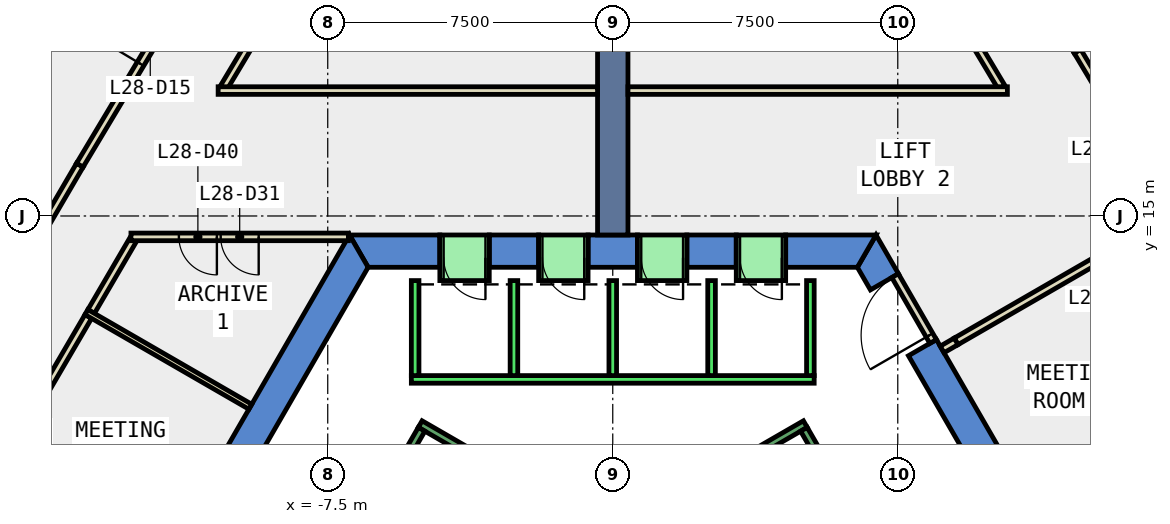
"""IFC4 building model, lengths in metres.
Left out: names, types, materials, properties, quantities, classifications, styles, units other than length and angle.
Written with IfcOpenShell. Run it as: python <this file> out.ifc"""

import sys

from ifc_helpers import new_model, si_unit, direction, frame, frame_2d, origin, place, context, subcontext, project, spatial, polyline, rectangle, outline, extrude, element, fill, save


model = new_model("IFC4")
c1 = context("Model", 3, precision=1e-05, world=origin(), true_north=direction((0.0, 1.0)))
c2 = subcontext(c1, "Body", "Model", "MODEL_VIEW")
j1 = project(units=[si_unit("LENGTHUNIT", "METRE"), si_unit("PLANEANGLEUNIT", "RADIAN")], contexts=[c1])
p1 = place(None, origin())
s1 = spatial("IfcSite", under=j1, at=p1, CompositionType="ELEMENT")
p2 = place(p1, origin())
s2 = spatial("IfcBuilding", under=s1, at=p2, CompositionType="ELEMENT")
p3 = place(p2, frame((0.0, 0.0, 128.6)))
s3 = spatial("IfcBuildingStorey", under=s2, at=p3, CompositionType="ELEMENT", Elevation=128.6)
p4 = place(p3, frame((0.0, 0.0, -0.4)))
e1 = element("IfcWall", 1, at=p4, inside=s3, PredefinedType="SHEAR", context=c2, shape_type="SweptSolid", body=[
    extrude(outline(polyline([(8.517, 11.748), (7.781, 11.323), (12.875, 2.5), (13.856, 2.5), (8.517, 11.748)])), origin(), (0.0, 0.0, 1.0), 4.0),
])
p5 = place(p3, frame((0.0, 0.0, -0.4)))
e2 = element("IfcWall", 2, at=p5, inside=s3, PredefinedType="SHEAR", context=c2, shape_type="SweptSolid", body=[
    extrude(outline(polyline([(6.781, 13.055), (7.517, 13.48), (6.928, 14.5), (6.437, 13.65), (6.781, 13.055)])), origin(), (0.0, 0.0, 1.0), 4.0),
])
p6 = place(p3, frame((0.0, 0.0, -0.4)))
e3 = element("IfcWall", 3, at=p6, inside=s3, PredefinedType="SHEAR", context=c2, shape_type="SweptSolid", body=[
    extrude(outline(polyline([(4.55, 14.5), (4.55, 13.65), (6.437, 13.65), (6.928, 14.5), (4.55, 14.5)])), origin(), (0.0, 0.0, 1.0), 4.0),
])
p7 = place(p3, frame((0.0, 0.0, -0.4)))
e4 = element("IfcWall", 4, at=p7, inside=s3, PredefinedType="SHEAR", context=c2, shape_type="SweptSolid", body=[
    extrude(outline(polyline([(1.95, 14.5), (1.95, 13.65), (3.25, 13.65), (3.25, 14.5), (1.95, 14.5)])), origin(), (0.0, 0.0, 1.0), 4.0),
])
p8 = place(p3, frame((0.0, 0.0, -0.4)))
e5 = element("IfcWall", 5, at=p8, inside=s3, PredefinedType="SHEAR", context=c2, shape_type="SweptSolid", body=[
    extrude(outline(polyline([(-0.65, 14.5), (-0.65, 13.65), (0.65, 13.65), (0.65, 14.5), (-0.65, 14.5)])), origin(), (0.0, 0.0, 1.0), 4.0),
])
p9 = place(p3, frame((0.0, 0.0, -0.4)))
e6 = element("IfcWall", 6, at=p9, inside=s3, PredefinedType="SHEAR", context=c2, shape_type="SweptSolid", body=[
    extrude(outline(polyline([(-3.25, 14.5), (-3.25, 13.65), (-1.95, 13.65), (-1.95, 14.5), (-3.25, 14.5)])), origin(), (0.0, 0.0, 1.0), 4.0),
])
p10 = place(p3, frame((0.0, 0.0, -0.4)))
e7 = element("IfcWall", 7, at=p10, inside=s3, PredefinedType="SHEAR", context=c2, shape_type="SweptSolid", body=[
    extrude(outline(polyline([(-4.55, 13.65), (-4.55, 14.5), (-6.928, 14.5), (-6.437, 13.65), (-4.55, 13.65)])), origin(), (0.0, 0.0, 1.0), 4.0),
])
p11 = place(p3, frame((0.0, 0.0, -0.4)))
e8 = element("IfcWall", 8, at=p11, inside=s3, PredefinedType="SHEAR", context=c2, shape_type="SweptSolid", body=[
    extrude(outline(polyline([(-12.267, 5.252), (-11.531, 4.827), (-6.437, 13.65), (-6.928, 14.5), (-12.267, 5.252)])), origin(), (0.0, 0.0, 1.0), 4.0),
])
p12 = place(p3, frame((0.0, 14.5, -0.4), z_axis=(0.0, 0.0, 1.0), x_axis=(0.0, 1.0, 0.0)))
e9 = element("IfcWall", 9, at=p12, inside=s3, PredefinedType="SHEAR", context=c2, shape_type="SweptSolid", body=[
    extrude(rectangle(XDim=9.0, YDim=0.8, at=frame_2d((4.5, 0.0))), origin(), (0.0, 0.0, 1.0), 4.0),
])
p13 = place(p3, frame((-12.628, 14.364, 0.0), z_axis=(0.0, 0.0, 1.0), x_axis=(-0.504457175129, -0.863436713639, 0.0)))
e10 = element("IfcWall", 10, at=p13, inside=s3, PredefinedType="PARTITIONING", context=c2, shape_type="SweptSolid", body=[
    extrude(rectangle(XDim=2.175, YDim=0.2, at=frame_2d((1.087, 0.0))), origin(), (0.0, 0.0, 1.0), 3.6),
])
p14 = place(p3, frame((-13.801, 12.356, 0.0), z_axis=(0.0, 0.0, 1.0), x_axis=(-0.504282474222, -0.863538757782, 0.0)))
e11 = element("IfcWall", 11, at=p14, inside=s3, PredefinedType="PARTITIONING", context=c2, shape_type="SweptSolid", body=[
    extrude(rectangle(XDim=3.8, YDim=0.2, at=frame_2d((1.9, 0.0))), origin(), (0.0, 0.0, 1.0), 3.6),
])
p15 = place(p3, frame((12.798, 13.873, 0.0), z_axis=(0.0, 0.0, 1.0), x_axis=(-0.866080799279, -0.499904039911, 0.0)))
e12 = element("IfcWall", 12, at=p15, inside=s3, PredefinedType="PARTITIONING", context=c2, shape_type="SweptSolid", body=[
    extrude(rectangle(XDim=4.345, YDim=0.2, at=frame_2d((2.172, 0.0))), origin(), (0.0, 0.0, 1.0), 3.6),
])
for number, where, z_axis, x_axis in (
    (13, (10.232, 18.386, 0.0), (0.0, 0.0, 1.0), (-0.514, 0.858, 0.0)),
    (14, (-8.475, 21.321, 0.0), (0.0, 0.0, 1.0), (-0.514, -0.858, 0.0)),
):
    element("IfcWall", number, at=place(p3, frame(where, z_axis=z_axis, x_axis=x_axis)), inside=s3, PredefinedType="PARTITIONING", context=c2, shape_type="SweptSolid", body=[
        extrude(rectangle(XDim=3.421, YDim=0.2, at=frame_2d((1.71, 0.0))), origin(), (0.0, 0.0, 1.0), 3.6),
    ])
p16 = place(p3, frame((12.228, 19.335, 0.0), z_axis=(0.0, 0.0, 1.0), x_axis=(0.513796731551, -0.857911952736, 0.0)))
e15 = element("IfcWall", 15, at=p16, inside=s3, PredefinedType="PARTITIONING", context=c2, shape_type="SweptSolid", body=[
    extrude(rectangle(XDim=3.493, YDim=0.2, at=frame_2d((1.747, 0.0))), origin(), (0.0, 0.0, 1.0), 3.6),
])
p17 = place(p16, frame((1.247, 0.0, 0.0)))
e16 = element("IfcOpeningElement", 16, at=p17, cuts=e15, PredefinedType="OPENING", context=c2, shape_type="SweptSolid", body=[
    extrude(rectangle(XDim=1.0, YDim=2.1, at=frame_2d((0.5, 1.05))), frame((0.0, 0.11, 0.0), z_axis=(0.0, -1.0, 0.0), x_axis=(1.0, 0.0, 0.0)), (0.0, 0.0, 1.0), 0.22),
])
p18 = place(p3, frame((-15.784, 13.322, 0.0), z_axis=(0.0, 0.0, 1.0), x_axis=(0.50424043703, 0.863563304954, 0.0)))
e17 = element("IfcWall", 17, at=p18, inside=s3, PredefinedType="PARTITIONING", context=c2, shape_type="SweptSolid", body=[
    extrude(rectangle(XDim=3.492, YDim=0.2, at=frame_2d((1.746, 0.0))), origin(), (0.0, 0.0, 1.0), 3.6),
])
p19 = place(p3, frame((-14.023, 16.338, 0.0), z_axis=(0.0, 0.0, 1.0), x_axis=(0.513773581048, 0.857925816966, 0.0)))
e18 = element("IfcWall", 18, at=p19, inside=s3, PredefinedType="PARTITIONING", context=c2, shape_type="SweptSolid", body=[
    extrude(rectangle(XDim=7.061, YDim=0.2, at=frame_2d((3.531, 0.0))), origin(), (0.0, 0.0, 1.0), 3.6),
])
p20 = place(p19, frame((3.106, 0.0, 0.0)))
e19 = element("IfcOpeningElement", 19, at=p20, cuts=e18, PredefinedType="OPENING", context=c2, shape_type="SweptSolid", body=[
    extrude(rectangle(XDim=1.0, YDim=2.1, at=frame_2d((0.5, 1.05))), frame((0.0, 0.11, 0.0), z_axis=(0.0, -1.0, 0.0), x_axis=(1.0, 0.0, 0.0)), (0.0, 0.0, 1.0), 0.22),
])
p21 = place(p3, frame((-9.537, 9.981, 0.0), z_axis=(0.0, 0.0, 1.0), x_axis=(-0.866035377451, 0.499982724704, 0.0)))
e20 = element("IfcWall", 20, at=p21, inside=s3, PredefinedType="PARTITIONING", context=c2, shape_type="SweptSolid", body=[
    extrude(rectangle(XDim=4.98, YDim=0.15, at=frame_2d((2.49, 0.0))), origin(), (0.0, 0.0, 1.0), 3.6),
])
p22 = place(p3, frame((-6.957, 14.45, 0.0), z_axis=(0.0, 0.0, 1.0), x_axis=(-1.0, 0.0, 0.0)))
e21 = element("IfcWall", 21, at=p22, inside=s3, PredefinedType="PARTITIONING", context=c2, shape_type="SweptSolid", body=[
    extrude(rectangle(XDim=5.721, YDim=0.2, at=frame_2d((2.86, 0.0))), origin(), (0.0, 0.0, 1.0), 3.6),
])
p23 = place(p22, frame((2.36, 0.0, 0.0)))
e22 = element("IfcOpeningElement", 22, at=p23, cuts=e21, PredefinedType="OPENING", context=c2, shape_type="SweptSolid", body=[
    extrude(rectangle(XDim=1.0, YDim=2.1, at=frame_2d((0.5, 1.05))), frame((0.0, 0.11, 0.0), z_axis=(0.0, -1.0, 0.0), x_axis=(1.0, 0.0, 0.0)), (0.0, 0.0, 1.0), 0.22),
])
p24 = place(p22, frame((3.46, 0.0, 0.0)))
e23 = element("IfcOpeningElement", 23, at=p24, cuts=e21, PredefinedType="OPENING", context=c2, shape_type="SweptSolid", body=[
    extrude(rectangle(XDim=1.0, YDim=2.1, at=frame_2d((0.5, 1.05))), frame((0.0, 0.11, 0.0), z_axis=(0.0, -1.0, 0.0), x_axis=(1.0, 0.0, 0.0)), (0.0, 0.0, 1.0), 0.22),
])
p25 = place(p3, frame((11.261, 6.994, 0.0), z_axis=(0.0, 0.0, 1.0), x_axis=(0.866013769041, 0.500020151426, 0.0)))
e24 = element("IfcWall", 24, at=p25, inside=s3, PredefinedType="PARTITIONING", context=c2, shape_type="SweptSolid", body=[
    extrude(rectangle(XDim=4.898, YDim=0.15, at=frame_2d((2.449, 0.0))), origin(), (0.0, 0.0, 1.0), 3.6),
])
for number, where, z_axis, x_axis in (
    (25, (0.4, 18.3, 0.0), (0.0, 0.0, 1.0), (1.0, 0.0, 0.0)),
    (26, (-10.384, 18.3, 0.0), (0.0, 0.0, 1.0), (1.0, 0.0, 0.0)),
):
    element("IfcWall", number, at=place(p3, frame(where, z_axis=z_axis, x_axis=x_axis)), inside=s3, PredefinedType="PARTITIONING", context=c2, shape_type="SweptSolid", body=[
        extrude(rectangle(XDim=9.984, YDim=0.2, at=frame_2d((4.992, 0.0))), origin(), (0.0, 0.0, 1.0), 3.6),
    ])
p26 = place(p3, frame((12.104, 19.348, 0.0), z_axis=(0.0, 0.0, 1.0), x_axis=(0.85799008499, 0.513666247732, 0.0)))
e27 = element("IfcWall", 27, at=p26, inside=s3, PredefinedType="PARTITIONING", context=c2, shape_type="SweptSolid", body=[
    extrude(rectangle(XDim=7.1, YDim=0.15, at=frame_2d((3.55, 0.0))), origin(), (0.0, 0.0, 1.0), 3.6),
])
p27 = place(p3, frame((8.43, 11.698, 0.0), z_axis=(0.0, 0.0, 1.0), x_axis=(-0.50002537861, 0.866010750942, 0.0)))
e28 = element("IfcWall", 28, at=p27, inside=s3, PredefinedType="PARTITIONING", context=c2, shape_type="SweptSolid", body=[
    extrude(rectangle(XDim=2.0, YDim=0.2, at=frame_2d((1.0, 0.0))), origin(), (0.0, 0.0, 1.0), 2.4),
])
p28 = place(p27, frame((0.19, 0.0, 0.0)))
e29 = element("IfcOpeningElement", 29, at=p28, cuts=e28, PredefinedType="OPENING", context=c2, shape_type="SweptSolid", body=[
    extrude(rectangle(XDim=1.8, YDim=2.1, at=frame_2d((0.9, 1.05))), frame((0.0, 0.11, 0.0), z_axis=(0.0, -1.0, 0.0), x_axis=(1.0, 0.0, 0.0)), (0.0, 0.0, 1.0), 0.22),
])
p29 = place(p3, frame((9.035, 11.701, 0.0), z_axis=(0.0, 0.0, 1.0), x_axis=(-0.865544229481, -0.500832493767, 0.0)))
e30 = element("IfcWall", 30, at=p29, inside=s3, PredefinedType="PARTITIONING", context=c2, shape_type="SweptSolid", body=[
    extrude(rectangle(XDim=0.425, YDim=0.2, at=frame_2d((0.212, 0.0))), origin(), (0.0, 0.0, 1.0), 2.4),
])
p30 = place(p3, frame((5.3, 10.7, 0.0), z_axis=(0.0, 0.0, 1.0), x_axis=(-1.0, 0.0, 0.0)))
e31 = element("IfcWall", 31, at=p30, inside=s3, PredefinedType="STANDARD", context=c2, shape_type="SweptSolid", body=[
    extrude(rectangle(XDim=10.6, YDim=0.2, at=frame_2d((5.3, 0.0))), origin(), (0.0, 0.0, 1.0), 3.6),
])
for number, where, z_axis, x_axis in (
    (32, (5.2, 10.8, 0.0), (0.0, 0.0, 1.0), (0.0, 1.0, 0.0)),
    (33, (2.6, 10.8, 0.0), (0.0, 0.0, 1.0), (0.0, 1.0, 0.0)),
    (34, (0.0, 10.8, 0.0), (0.0, 0.0, 1.0), (0.0, 1.0, 0.0)),
    (35, (-2.6, 10.8, 0.0), (0.0, 0.0, 1.0), (0.0, 1.0, 0.0)),
    (36, (-5.2, 10.8, 0.0), (0.0, 0.0, 1.0), (0.0, 1.0, 0.0)),
):
    element("IfcWall", number, at=place(p3, frame(where, z_axis=z_axis, x_axis=x_axis)), inside=s3, PredefinedType="STANDARD", context=c2, shape_type="SweptSolid", body=[
        extrude(rectangle(XDim=2.5, YDim=0.2, at=frame_2d((1.25, 0.0))), origin(), (0.0, 0.0, 1.0), 3.6),
    ])
p31 = place(p3, frame((4.55, 13.9, 0.0), z_axis=(0.0, 0.0, 1.0), x_axis=(-1.0, 0.0, 0.0)))
e37 = element("IfcWall", 37, at=p31, inside=s3, PredefinedType="STANDARD", context=c2, shape_type="SweptSolid", body=[
    extrude(rectangle(XDim=1.3, YDim=1.2, at=frame_2d((0.65, 0.0))), origin(), (0.0, 0.0, 1.0), 2.4),
])
p32 = place(p31, frame((0.1, 0.0, 0.0)))
e38 = element("IfcOpeningElement", 38, at=p32, cuts=e37, PredefinedType="OPENING", context=c2, shape_type="SweptSolid", body=[
    extrude(rectangle(XDim=1.1, YDim=2.3, at=frame_2d((0.55, 1.15))), frame((0.0, 0.61, 0.0), z_axis=(0.0, -1.0, 0.0), x_axis=(1.0, 0.0, 0.0)), (0.0, 0.0, 1.0), 1.22),
])
p33 = place(p3, frame((1.95, 13.9, 0.0), z_axis=(0.0, 0.0, 1.0), x_axis=(-1.0, 0.0, 0.0)))
e39 = element("IfcWall", 39, at=p33, inside=s3, PredefinedType="STANDARD", context=c2, shape_type="SweptSolid", body=[
    extrude(rectangle(XDim=1.3, YDim=1.2, at=frame_2d((0.65, 0.0))), origin(), (0.0, 0.0, 1.0), 2.4),
])
p34 = place(p33, frame((0.1, 0.0, 0.0)))
e40 = element("IfcOpeningElement", 40, at=p34, cuts=e39, PredefinedType="OPENING", context=c2, shape_type="SweptSolid", body=[
    extrude(rectangle(XDim=1.1, YDim=2.3, at=frame_2d((0.55, 1.15))), frame((0.0, 0.61, 0.0), z_axis=(0.0, -1.0, 0.0), x_axis=(1.0, 0.0, 0.0)), (0.0, 0.0, 1.0), 1.22),
])
p35 = place(p3, frame((-0.65, 13.9, 0.0), z_axis=(0.0, 0.0, 1.0), x_axis=(-1.0, 0.0, 0.0)))
e41 = element("IfcWall", 41, at=p35, inside=s3, PredefinedType="STANDARD", context=c2, shape_type="SweptSolid", body=[
    extrude(rectangle(XDim=1.3, YDim=1.2, at=frame_2d((0.65, 0.0))), origin(), (0.0, 0.0, 1.0), 2.4),
])
p36 = place(p35, frame((0.1, 0.0, 0.0)))
e42 = element("IfcOpeningElement", 42, at=p36, cuts=e41, PredefinedType="OPENING", context=c2, shape_type="SweptSolid", body=[
    extrude(rectangle(XDim=1.1, YDim=2.3, at=frame_2d((0.55, 1.15))), frame((0.0, 0.61, 0.0), z_axis=(0.0, -1.0, 0.0), x_axis=(1.0, 0.0, 0.0)), (0.0, 0.0, 1.0), 1.22),
])
p37 = place(p3, frame((-3.25, 13.9, 0.0), z_axis=(0.0, 0.0, 1.0), x_axis=(-1.0, 0.0, 0.0)))
e43 = element("IfcWall", 43, at=p37, inside=s3, PredefinedType="STANDARD", context=c2, shape_type="SweptSolid", body=[
    extrude(rectangle(XDim=1.3, YDim=1.2, at=frame_2d((0.65, 0.0))), origin(), (0.0, 0.0, 1.0), 2.4),
])
p38 = place(p37, frame((0.1, 0.0, 0.0)))
e44 = element("IfcOpeningElement", 44, at=p38, cuts=e43, PredefinedType="OPENING", context=c2, shape_type="SweptSolid", body=[
    extrude(rectangle(XDim=1.1, YDim=2.3, at=frame_2d((0.55, 1.15))), frame((0.0, 0.61, 0.0), z_axis=(0.0, -1.0, 0.0), x_axis=(1.0, 0.0, 0.0)), (0.0, 0.0, 1.0), 1.22),
])
p39 = place(p3, frame((1.256, 7.324, 0.0), z_axis=(0.0, 0.0, 1.0), x_axis=(0.866046073146, 0.499964197906, 0.0)))
e45 = element("IfcWall", 45, at=p39, inside=s3, PredefinedType="STANDARD", context=c2, shape_type="SweptSolid", body=[
    extrude(rectangle(XDim=4.4, YDim=0.2, at=frame_2d((2.2, 0.0))), origin(), (0.0, 0.0, 1.0), 3.6),
])
p40 = place(p3, frame((8.48, 3.412, 0.0), z_axis=(0.0, 0.0, 1.0), x_axis=(-0.499978703459, 0.866037698999, 0.0)))
e46 = element("IfcWall", 46, at=p40, inside=s3, PredefinedType="STANDARD", context=c2, shape_type="SweptSolid", body=[
    extrude(rectangle(XDim=6.9, YDim=0.2, at=frame_2d((3.45, 0.0))), origin(), (0.0, 0.0, 1.0), 3.6),
])
p41 = place(p3, frame((-1.256, 7.324, 0.0), z_axis=(0.0, 0.0, 1.0), x_axis=(-0.866046073146, 0.499964197906, 0.0)))
e47 = element("IfcWall", 47, at=p41, inside=s3, PredefinedType="STANDARD", context=c2, shape_type="SweptSolid", body=[
    extrude(rectangle(XDim=4.4, YDim=0.2, at=frame_2d((2.2, 0.0))), origin(), (0.0, 0.0, 1.0), 3.6),
])
p42 = place(p41, frame((1.65, 0.0, 0.0)))
e48 = element("IfcOpeningElement", 48, at=p42, cuts=e47, PredefinedType="OPENING", context=c2, shape_type="SweptSolid", body=[
    extrude(rectangle(XDim=1.1, YDim=2.2, at=frame_2d((0.55, 1.1))), frame((0.0, 0.11, 0.0), z_axis=(0.0, -1.0, 0.0), x_axis=(1.0, 0.0, 0.0)), (0.0, 0.0, 1.0), 0.22),
])
p43 = place(p3, frame((-5.03, 9.388, 0.0), z_axis=(0.0, 0.0, 1.0), x_axis=(-0.499978703459, -0.866037698999, 0.0)))
e49 = element("IfcWall", 49, at=p43, inside=s3, PredefinedType="STANDARD", context=c2, shape_type="SweptSolid", body=[
    extrude(rectangle(XDim=6.9, YDim=0.2, at=frame_2d((3.45, 0.0))), origin(), (0.0, 0.0, 1.0), 3.6),
])
p44 = place(p20, origin())
e50 = element("IfcDoor", 50, at=p44, inside=s3, OperationType="SINGLE_SWING_LEFT", PredefinedType="DOOR", context=c2, shape_type="SweptSolid", body=[
    extrude(rectangle(XDim=1.0, YDim=2.1, at=frame_2d((0.5, 1.05))), frame((0.0, 0.025, 0.0), z_axis=(0.0, -1.0, 0.0), x_axis=(1.0, 0.0, 0.0)), (0.0, 0.0, 1.0), 0.05),
])
fill(e19, e50)
p45 = place(p23, origin())
e51 = element("IfcDoor", 51, at=p45, inside=s3, OperationType="SINGLE_SWING_LEFT", PredefinedType="DOOR", context=c2, shape_type="SweptSolid", body=[
    extrude(rectangle(XDim=1.0, YDim=2.1, at=frame_2d((0.5, 1.05))), frame((0.0, 0.025, 0.0), z_axis=(0.0, -1.0, 0.0), x_axis=(1.0, 0.0, 0.0)), (0.0, 0.0, 1.0), 0.05),
])
fill(e22, e51)
p46 = place(p24, origin())
e52 = element("IfcDoor", 52, at=p46, inside=s3, OperationType="SINGLE_SWING_RIGHT", PredefinedType="DOOR", context=c2, shape_type="SweptSolid", body=[
    extrude(rectangle(XDim=1.0, YDim=2.1, at=frame_2d((0.5, 1.05))), frame((0.0, 0.025, 0.0), z_axis=(0.0, -1.0, 0.0), x_axis=(1.0, 0.0, 0.0)), (0.0, 0.0, 1.0), 0.05),
])
fill(e23, e52)
p47 = place(p28, origin())
e53 = element("IfcDoor", 53, at=p47, inside=s3, OperationType="DOUBLE_DOOR_SINGLE_SWING", PredefinedType="DOOR", context=c2, shape_type="SweptSolid", body=[
    extrude(rectangle(XDim=1.8, YDim=2.1, at=frame_2d((0.9, 1.05))), frame((0.0, 0.025, 0.0), z_axis=(0.0, -1.0, 0.0), x_axis=(1.0, 0.0, 0.0)), (0.0, 0.0, 1.0), 0.05),
])
fill(e29, e53)
p48 = place(p32, origin())
e54 = element("IfcDoor", 54, at=p48, inside=s3, OperationType="SLIDING_TO_LEFT", PredefinedType="DOOR", context=c2, shape_type="SweptSolid", body=[
    extrude(rectangle(XDim=1.1, YDim=2.3, at=frame_2d((0.55, 1.15))), frame((0.0, 0.025, 0.0), z_axis=(0.0, -1.0, 0.0), x_axis=(1.0, 0.0, 0.0)), (0.0, 0.0, 1.0), 0.05),
])
fill(e38, e54)
p49 = place(p34, origin())
e55 = element("IfcDoor", 55, at=p49, inside=s3, OperationType="SLIDING_TO_LEFT", PredefinedType="DOOR", context=c2, shape_type="SweptSolid", body=[
    extrude(rectangle(XDim=1.1, YDim=2.3, at=frame_2d((0.55, 1.15))), frame((0.0, 0.025, 0.0), z_axis=(0.0, -1.0, 0.0), x_axis=(1.0, 0.0, 0.0)), (0.0, 0.0, 1.0), 0.05),
])
fill(e40, e55)
p50 = place(p36, origin())
e56 = element("IfcDoor", 56, at=p50, inside=s3, OperationType="SLIDING_TO_LEFT", PredefinedType="DOOR", context=c2, shape_type="SweptSolid", body=[
    extrude(rectangle(XDim=1.1, YDim=2.3, at=frame_2d((0.55, 1.15))), frame((0.0, 0.025, 0.0), z_axis=(0.0, -1.0, 0.0), x_axis=(1.0, 0.0, 0.0)), (0.0, 0.0, 1.0), 0.05),
])
fill(e42, e56)
p51 = place(p38, origin())
e57 = element("IfcDoor", 57, at=p51, inside=s3, OperationType="SLIDING_TO_LEFT", PredefinedType="DOOR", context=c2, shape_type="SweptSolid", body=[
    extrude(rectangle(XDim=1.1, YDim=2.3, at=frame_2d((0.55, 1.15))), frame((0.0, 0.025, 0.0), z_axis=(0.0, -1.0, 0.0), x_axis=(1.0, 0.0, 0.0)), (0.0, 0.0, 1.0), 0.05),
])
fill(e44, e57)
save(model, sys.argv[1])
